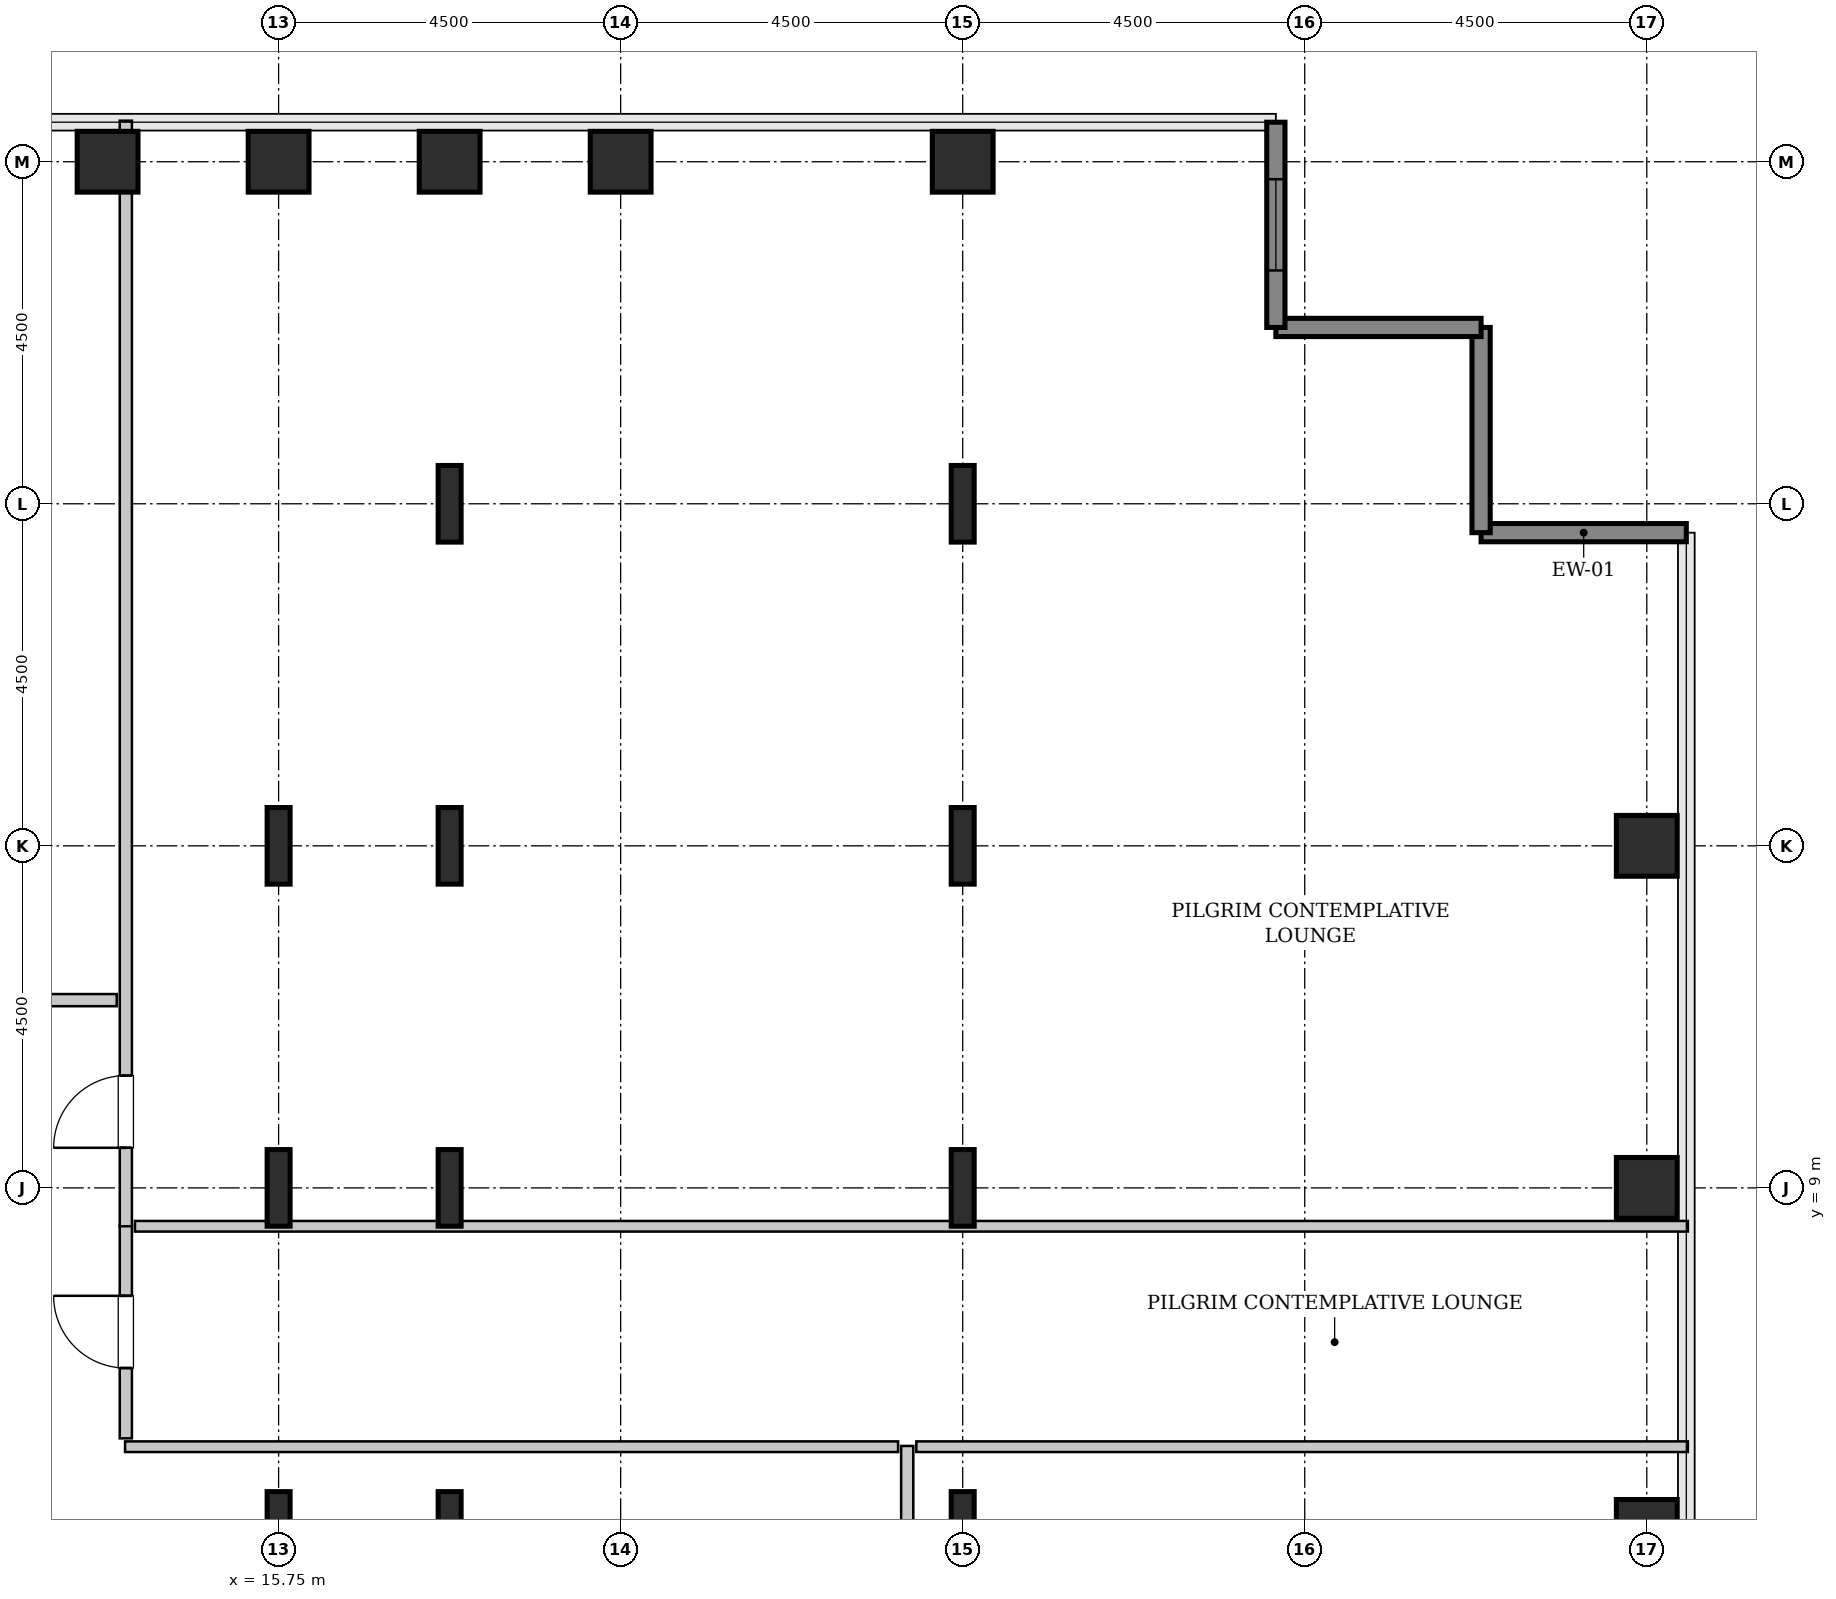
"""IFC4 building model, lengths in metres.
Left out: names, types, materials, properties, quantities, classifications, styles, units other than length and angle.
Written with IfcOpenShell. Run it as: python <this file> out.ifc"""

import sys

from ifc_helpers import new_model, si_unit, direction, frame, frame_2d, origin, origin_2d, place, context, subcontext, project, spatial, rectangle, hollow_rectangle, i_section, extrude, source, transform, mapped, element, fill, save


model = new_model("IFC4")
c1 = context("Model", 3, precision=1e-05, world=origin(), true_north=direction((0.0, 1.0)))
c2 = subcontext(c1, "Body", "Model", "MODEL_VIEW")
j1 = project(units=[si_unit("LENGTHUNIT", "METRE"), si_unit("PLANEANGLEUNIT", "RADIAN")], contexts=[c1])
p1 = place(None, origin())
s1 = spatial("IfcSite", under=j1, at=p1, CompositionType="ELEMENT")
p2 = place(p1, origin())
s2 = spatial("IfcBuilding", under=s1, at=p2, CompositionType="ELEMENT")
p3 = place(p2, frame((0.0, 0.0, 140.2)))
s3 = spatial("IfcBuildingStorey", under=s2, at=p3, CompositionType="ELEMENT", Elevation=140.2)
m1 = source(origin(), c2, "Body", "SweptSolid", [
    extrude(hollow_rectangle(XDim=0.8, YDim=0.8, WallThickness=0.04, InnerFilletRadius=0.04, OuterFilletRadius=0.08, at=origin_2d()), origin(), (0.0, 0.0, 1.0), 3.8),
])
p4 = place(p3, frame((13.5, 22.5, 0.0), z_axis=(0.0, 0.0, 1.0), x_axis=(1.0, 0.0, 0.0)))
e1 = element("IfcColumn", 1, at=p4, inside=s3, PredefinedType="COLUMN", context=c2, shape_type="MappedRepresentation", body=[
    mapped(m1, transform((0.0, 0.0, 0.0), x_axis=(1.0, 0.0, 0.0), y_axis=(0.0, 1.0, 0.0), z_axis=(0.0, 0.0, 1.0), scale=1.0)),
])
m2 = source(origin(), c2, "Body", "SweptSolid", [
    extrude(i_section(OverallWidth=0.302, OverallDepth=1.008, WebThickness=0.021, FlangeThickness=0.04, FilletRadius=0.03, at=origin_2d()), origin(), (0.0, 0.0, 1.0), 3.8),
])
for number, where, z_axis, x_axis in (
    (2, (15.75, 4.5, 0.0), (0.0, 0.0, 1.0), (1.0, 0.0, 0.0)),
    (3, (15.75, 9.0, 0.0), (0.0, 0.0, 1.0), (1.0, 0.0, 0.0)),
    (4, (15.75, 13.5, 0.0), (0.0, 0.0, 1.0), (1.0, 0.0, 0.0)),
):
    element("IfcColumn", number, at=place(p3, frame(where, z_axis=z_axis, x_axis=x_axis)), inside=s3, PredefinedType="COLUMN", context=c2, shape_type="MappedRepresentation", body=[
        mapped(m2, transform((0.0, 0.0, 0.0), x_axis=(1.0, 0.0, 0.0), y_axis=(0.0, 1.0, 0.0), z_axis=(0.0, 0.0, 1.0), scale=1.0)),
    ])
p5 = place(p3, frame((15.75, 22.5, 0.0), z_axis=(0.0, 0.0, 1.0), x_axis=(1.0, 0.0, 0.0)))
e5 = element("IfcColumn", 5, at=p5, inside=s3, PredefinedType="COLUMN", context=c2, shape_type="MappedRepresentation", body=[
    mapped(m1, transform((0.0, 0.0, 0.0), x_axis=(1.0, 0.0, 0.0), y_axis=(0.0, 1.0, 0.0), z_axis=(0.0, 0.0, 1.0), scale=1.0)),
])
for number, where, z_axis, x_axis in (
    (6, (18.0, 4.5, 0.0), (0.0, 0.0, 1.0), (1.0, 0.0, 0.0)),
    (7, (18.0, 9.0, 0.0), (0.0, 0.0, 1.0), (1.0, 0.0, 0.0)),
    (8, (18.0, 13.5, 0.0), (0.0, 0.0, 1.0), (1.0, 0.0, 0.0)),
    (9, (18.0, 18.0, 0.0), (0.0, 0.0, 1.0), (1.0, 0.0, 0.0)),
):
    element("IfcColumn", number, at=place(p3, frame(where, z_axis=z_axis, x_axis=x_axis)), inside=s3, PredefinedType="COLUMN", context=c2, shape_type="MappedRepresentation", body=[
        mapped(m2, transform((0.0, 0.0, 0.0), x_axis=(1.0, 0.0, 0.0), y_axis=(0.0, 1.0, 0.0), z_axis=(0.0, 0.0, 1.0), scale=1.0)),
    ])
for number, where, z_axis, x_axis in (
    (10, (18.0, 22.5, 0.0), (0.0, 0.0, 1.0), (1.0, 0.0, 0.0)),
    (11, (20.25, 22.5, 0.0), (0.0, 0.0, 1.0), (1.0, 0.0, 0.0)),
):
    element("IfcColumn", number, at=place(p3, frame(where, z_axis=z_axis, x_axis=x_axis)), inside=s3, PredefinedType="COLUMN", context=c2, shape_type="MappedRepresentation", body=[
        mapped(m1, transform((0.0, 0.0, 0.0), x_axis=(1.0, 0.0, 0.0), y_axis=(0.0, 1.0, 0.0), z_axis=(0.0, 0.0, 1.0), scale=1.0)),
    ])
for number, where, z_axis, x_axis in (
    (12, (24.75, 4.5, 0.0), (0.0, 0.0, 1.0), (1.0, 0.0, 0.0)),
    (13, (24.75, 9.0, 0.0), (0.0, 0.0, 1.0), (1.0, 0.0, 0.0)),
    (14, (24.75, 13.5, 0.0), (0.0, 0.0, 1.0), (1.0, 0.0, 0.0)),
    (15, (24.75, 18.0, 0.0), (0.0, 0.0, 1.0), (1.0, 0.0, 0.0)),
):
    element("IfcColumn", number, at=place(p3, frame(where, z_axis=z_axis, x_axis=x_axis)), inside=s3, PredefinedType="COLUMN", context=c2, shape_type="MappedRepresentation", body=[
        mapped(m2, transform((0.0, 0.0, 0.0), x_axis=(1.0, 0.0, 0.0), y_axis=(0.0, 1.0, 0.0), z_axis=(0.0, 0.0, 1.0), scale=1.0)),
    ])
for number, where, z_axis, x_axis in (
    (16, (24.75, 22.5, 0.0), (0.0, 0.0, 1.0), (1.0, 0.0, 0.0)),
    (17, (33.75, 4.5, 0.0), (0.0, 0.0, 1.0), (1.0, 0.0, 0.0)),
    (18, (33.75, 9.0, 0.0), (0.0, 0.0, 1.0), (1.0, 0.0, 0.0)),
    (19, (33.75, 13.5, 0.0), (0.0, 0.0, 1.0), (1.0, 0.0, 0.0)),
):
    element("IfcColumn", number, at=place(p3, frame(where, z_axis=z_axis, x_axis=x_axis)), inside=s3, PredefinedType="COLUMN", context=c2, shape_type="MappedRepresentation", body=[
        mapped(m1, transform((0.0, 0.0, 0.0), x_axis=(1.0, 0.0, 0.0), y_axis=(0.0, 1.0, 0.0), z_axis=(0.0, 0.0, 1.0), scale=1.0)),
    ])
m3 = source(origin(), c2, "Body", "SweptSolid", [
    extrude(rectangle(XDim=2.7, YDim=0.24, at=frame_2d((1.35, 0.0))), origin(), (0.0, 0.0, 1.0), 3.5),
])
for number, where, z_axis, x_axis in (
    (20, (34.27, 17.62, 0.0), (0.0, 0.0, 1.0), (-1.0, 0.0, 0.0)),
    (21, (31.57, 17.62, 0.0), (0.0, 0.0, 1.0), (0.0, 1.0, 0.0)),
    (22, (31.57, 20.32, 0.0), (0.0, 0.0, 1.0), (-1.0, 0.0, 0.0)),
):
    element("IfcWall", number, at=place(p3, frame(where, z_axis=z_axis, x_axis=x_axis)), inside=s3, PredefinedType="SHEAR", context=c2, shape_type="MappedRepresentation", body=[
        mapped(m3, transform((0.0, 0.0, 0.0), x_axis=(1.0, 0.0, 0.0), y_axis=(0.0, 1.0, 0.0), z_axis=(0.0, 0.0, 1.0), scale=1.0)),
    ])
p6 = place(p3, frame((28.87, 20.32, 0.0), z_axis=(0.0, 0.0, 1.0), x_axis=(0.0, 1.0, 0.0)))
e23 = element("IfcWall", 23, at=p6, inside=s3, PredefinedType="SHEAR", context=c2, shape_type="MappedRepresentation", body=[
    mapped(m3, transform((0.0, 0.0, 0.0), x_axis=(1.0, 0.0, 0.0), y_axis=(0.0, 1.0, 0.0), z_axis=(0.0, 0.0, 1.0), scale=1.0)),
])
p7 = place(p6, frame((0.75, 0.0, 0.85)))
e24 = element("IfcOpeningElement", 24, at=p7, cuts=e23, PredefinedType="OPENING", context=c2, shape_type="SweptSolid", body=[
    extrude(rectangle(XDim=1.2, YDim=1.8, at=frame_2d((0.6, 0.9))), frame((0.0, 0.13, 0.0), z_axis=(0.0, -1.0, 0.0), x_axis=(1.0, 0.0, 0.0)), (0.0, 0.0, 1.0), 0.26),
])
m4 = source(origin(), c2, "Body", "SweptSolid", [
    extrude(rectangle(XDim=7.3, YDim=0.16, at=frame_2d((3.65, 0.0))), origin(), (0.0, 0.0, 1.0), 3.485),
])
p8 = place(p3, frame((24.02, -1.695, 0.0), z_axis=(0.0, 0.0, 1.0), x_axis=(0.0, 1.0, 0.0)))
e25 = element("IfcWall", 25, at=p8, inside=s3, PredefinedType="PARTITIONING", context=c2, shape_type="MappedRepresentation", body=[
    mapped(m4, transform((0.0, 0.0, 0.0), x_axis=(1.0, 0.0, 0.0), y_axis=(0.0, 1.0, 0.0), z_axis=(0.0, 0.0, 1.0), scale=1.0)),
])
p9 = place(p8, frame((3.47, 0.0, 0.0)))
e26 = element("IfcOpeningElement", 26, at=p9, cuts=e25, PredefinedType="OPENING", context=c2, shape_type="SweptSolid", body=[
    extrude(rectangle(XDim=0.95, YDim=2.1, at=frame_2d((0.475, 1.05))), frame((0.0, 0.09, 0.0), z_axis=(0.0, -1.0, 0.0), x_axis=(1.0, 0.0, 0.0)), (0.0, 0.0, 1.0), 0.18),
])
m5 = source(origin(), c2, "Body", "SweptSolid", [
    extrude(rectangle(XDim=10.17, YDim=0.14, at=frame_2d((5.085, 0.0))), origin(), (0.0, 0.0, 1.0), 3.485),
])
p10 = place(p3, frame((13.73, 5.595, 0.0), z_axis=(0.0, 0.0, 1.0), x_axis=(1.0, 0.0, 0.0)))
e27 = element("IfcWall", 27, at=p10, inside=s3, PredefinedType="PARTITIONING", context=c2, shape_type="MappedRepresentation", body=[
    mapped(m5, transform((0.0, 0.0, 0.0), x_axis=(1.0, 0.0, 0.0), y_axis=(0.0, 1.0, 0.0), z_axis=(0.0, 0.0, 1.0), scale=1.0)),
])
m6 = source(origin(), c2, "Body", "SweptSolid", [
    extrude(rectangle(XDim=10.15, YDim=0.14, at=frame_2d((5.075, 0.0))), origin(), (0.0, 0.0, 1.0), 3.485),
])
p11 = place(p3, frame((24.14, 5.595, 0.0), z_axis=(0.0, 0.0, 1.0), x_axis=(1.0, 0.0, 0.0)))
e28 = element("IfcWall", 28, at=p11, inside=s3, PredefinedType="PARTITIONING", context=c2, shape_type="MappedRepresentation", body=[
    mapped(m6, transform((0.0, 0.0, 0.0), x_axis=(1.0, 0.0, 0.0), y_axis=(0.0, 1.0, 0.0), z_axis=(0.0, 0.0, 1.0), scale=1.0)),
])
m7 = source(origin(), c2, "Body", "SweptSolid", [
    extrude(rectangle(XDim=2.8, YDim=0.16, at=frame_2d((1.4, 0.0))), origin(), (0.0, 0.0, 1.0), 3.485),
])
p12 = place(p3, frame((13.74, 5.705, 0.0), z_axis=(0.0, 0.0, 1.0), x_axis=(0.0, 1.0, 0.0)))
e29 = element("IfcWall", 29, at=p12, inside=s3, PredefinedType="PARTITIONING", context=c2, shape_type="MappedRepresentation", body=[
    mapped(m7, transform((0.0, 0.0, 0.0), x_axis=(1.0, 0.0, 0.0), y_axis=(0.0, 1.0, 0.0), z_axis=(0.0, 0.0, 1.0), scale=1.0)),
])
p13 = place(p12, frame((0.925, 0.0, 0.0)))
e30 = element("IfcOpeningElement", 30, at=p13, cuts=e29, PredefinedType="OPENING", context=c2, shape_type="SweptSolid", body=[
    extrude(rectangle(XDim=0.95, YDim=2.1, at=frame_2d((0.475, 1.05))), frame((0.0, 0.09, 0.0), z_axis=(0.0, -1.0, 0.0), x_axis=(1.0, 0.0, 0.0)), (0.0, 0.0, 1.0), 0.18),
])
m8 = source(origin(), c2, "Body", "SweptSolid", [
    extrude(rectangle(XDim=20.43, YDim=0.14, at=frame_2d((10.215, 0.0))), origin(), (0.0, 0.0, 1.0), 2.825),
])
p14 = place(p3, frame((13.86, 8.495, 0.0), z_axis=(0.0, 0.0, 1.0), x_axis=(1.0, 0.0, 0.0)))
e31 = element("IfcWall", 31, at=p14, inside=s3, PredefinedType="PARTITIONING", context=c2, shape_type="MappedRepresentation", body=[
    mapped(m8, transform((0.0, 0.0, 0.0), x_axis=(1.0, 0.0, 0.0), y_axis=(0.0, 1.0, 0.0), z_axis=(0.0, 0.0, 1.0), scale=1.0)),
])
m9 = source(origin(), c2, "Body", "SweptSolid", [
    extrude(rectangle(XDim=14.545, YDim=0.16, at=frame_2d((7.272, 0.0))), origin(), (0.0, 0.0, 1.0), 3.485),
])
p15 = place(p3, frame((13.74, 8.495, 0.0), z_axis=(0.0, 0.0, 1.0), x_axis=(0.0, 1.0, 0.0)))
e32 = element("IfcWall", 32, at=p15, inside=s3, PredefinedType="PARTITIONING", context=c2, shape_type="MappedRepresentation", body=[
    mapped(m9, transform((0.0, 0.0, 0.0), x_axis=(1.0, 0.0, 0.0), y_axis=(0.0, 1.0, 0.0), z_axis=(0.0, 0.0, 1.0), scale=1.0)),
])
p16 = place(p15, frame((1.032, 0.0, 0.0)))
e33 = element("IfcOpeningElement", 33, at=p16, cuts=e32, PredefinedType="OPENING", context=c2, shape_type="SweptSolid", body=[
    extrude(rectangle(XDim=0.95, YDim=2.1, at=frame_2d((0.475, 1.05))), frame((0.0, 0.09, 0.0), z_axis=(0.0, -1.0, 0.0), x_axis=(1.0, 0.0, 0.0)), (0.0, 0.0, 1.0), 0.18),
])
m10 = source(origin(), c2, "Body", "SweptSolid", [
    extrude(rectangle(XDim=5.425, YDim=0.16, at=frame_2d((2.712, 0.0))), origin(), (0.0, 0.0, 1.0), 3.485),
])
p17 = place(p3, frame((8.195, 11.47, 0.0), z_axis=(0.0, 0.0, 1.0), x_axis=(1.0, 0.0, 0.0)))
e34 = element("IfcWall", 34, at=p17, inside=s3, PredefinedType="PARTITIONING", context=c2, shape_type="MappedRepresentation", body=[
    mapped(m10, transform((0.0, 0.0, 0.0), x_axis=(1.0, 0.0, 0.0), y_axis=(0.0, 1.0, 0.0), z_axis=(0.0, 0.0, 1.0), scale=1.0)),
])
p18 = place(p17, frame((2.238, 0.0, 0.0)))
e35 = element("IfcOpeningElement", 35, at=p18, cuts=e34, PredefinedType="OPENING", context=c2, shape_type="SweptSolid", body=[
    extrude(rectangle(XDim=0.95, YDim=2.1, at=frame_2d((0.475, 1.05))), frame((0.0, 0.09, 0.0), z_axis=(0.0, -1.0, 0.0), x_axis=(1.0, 0.0, 0.0)), (0.0, 0.0, 1.0), 0.18),
])
m11 = source(origin(), c2, "Body", "SweptSolid", [
    extrude(rectangle(XDim=1.2, YDim=1.8, at=frame_2d((0.6, 0.9))), frame((0.0, 0.03, 0.0), z_axis=(0.0, -1.0, 0.0), x_axis=(1.0, 0.0, 0.0)), (0.0, 0.0, 1.0), 0.06),
])
p19 = place(p7, origin())
e36 = element("IfcWindow", 36, at=p19, inside=s3, PartitioningType="SINGLE_PANEL", PredefinedType="WINDOW", context=c2, shape_type="MappedRepresentation", body=[
    mapped(m11, transform((0.0, 0.0, 0.0), x_axis=(1.0, 0.0, 0.0), y_axis=(0.0, 1.0, 0.0), z_axis=(0.0, 0.0, 1.0), scale=1.0)),
])
fill(e24, e36)
m12 = source(origin(), c2, "Body", "SweptSolid", [
    extrude(rectangle(XDim=0.95, YDim=2.1, at=frame_2d((0.475, 1.05))), frame((0.0, 0.025, 0.0), z_axis=(0.0, -1.0, 0.0), x_axis=(1.0, 0.0, 0.0)), (0.0, 0.0, 1.0), 0.05),
])
p20 = place(p13, origin())
e37 = element("IfcDoor", 37, at=p20, inside=s3, OperationType="SINGLE_SWING_RIGHT", PredefinedType="DOOR", context=c2, shape_type="MappedRepresentation", body=[
    mapped(m12, transform((0.0, 0.0, 0.0), x_axis=(1.0, 0.0, 0.0), y_axis=(0.0, 1.0, 0.0), z_axis=(0.0, 0.0, 1.0), scale=1.0)),
])
fill(e30, e37)
p21 = place(p16, origin())
e38 = element("IfcDoor", 38, at=p21, inside=s3, OperationType="SINGLE_SWING_LEFT", PredefinedType="DOOR", context=c2, shape_type="MappedRepresentation", body=[
    mapped(m12, transform((0.0, 0.0, 0.0), x_axis=(1.0, 0.0, 0.0), y_axis=(0.0, 1.0, 0.0), z_axis=(0.0, 0.0, 1.0), scale=1.0)),
])
fill(e33, e38)
save(model, sys.argv[1])
